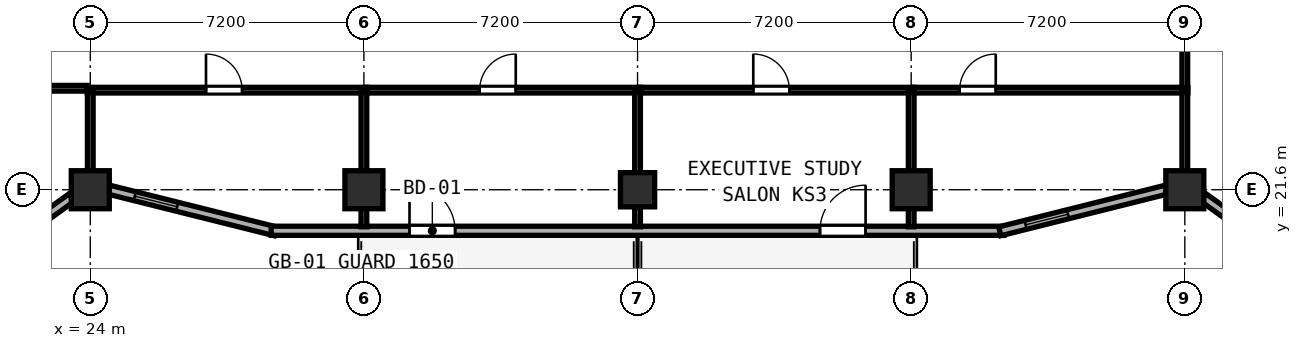
"""IFC4 building model, lengths in metres.
Left out: names, types, materials, properties, quantities, classifications, styles, units other than length and angle.
Written with IfcOpenShell. Run it as: python <this file> out.ifc"""

import sys

from ifc_helpers import new_model, si_unit, direction, frame, frame_2d, origin, origin_2d, place, context, subcontext, project, spatial, rectangle, hollow_rectangle, extrude, element, fill, save


model = new_model("IFC4")
c1 = context("Model", 3, precision=1e-05, world=origin(), true_north=direction((0.0, 1.0)))
c2 = subcontext(c1, "Body", "Model", "MODEL_VIEW")
j1 = project(units=[si_unit("LENGTHUNIT", "METRE"), si_unit("PLANEANGLEUNIT", "RADIAN")], contexts=[c1])
p1 = place(None, origin())
s1 = spatial("IfcSite", under=j1, at=p1, CompositionType="ELEMENT")
p2 = place(p1, origin())
s2 = spatial("IfcBuilding", under=s1, at=p2, CompositionType="ELEMENT")
p3 = place(p2, frame((0.0, 0.0, 98.4)))
s3 = spatial("IfcBuildingStorey", under=s2, at=p3, CompositionType="ELEMENT", Elevation=98.4)
for number, where, z_axis, x_axis in (
    (1, (24.0, 21.6, 0.0), (0.0, 0.0, 1.0), (1.0, 0.0, 0.0)),
    (2, (52.8, 21.6, 0.0), (0.0, 0.0, 1.0), (1.0, 0.0, 0.0)),
    (3, (31.2, 21.6, 0.0), (0.0, 0.0, 1.0), (1.0, 0.0, 0.0)),
    (4, (45.6, 21.6, 0.0), (0.0, 0.0, 1.0), (1.0, 0.0, 0.0)),
):
    element("IfcColumn", number, at=place(p3, frame(where, z_axis=z_axis, x_axis=x_axis)), inside=s3, PredefinedType="COLUMN", context=c2, shape_type="SweptSolid", body=[
        extrude(hollow_rectangle(XDim=1.0, YDim=1.0, WallThickness=0.038, at=origin_2d()), origin(), (0.0, 0.0, 1.0), 3.8),
    ])
p4 = place(p3, frame((38.4, 21.6, 0.0), z_axis=(0.0, 0.0, 1.0), x_axis=(1.0, 0.0, 0.0)))
e5 = element("IfcColumn", 5, at=p4, inside=s3, PredefinedType="COLUMN", context=c2, shape_type="SweptSolid", body=[
    extrude(hollow_rectangle(XDim=0.9, YDim=0.9, WallThickness=0.034, at=origin_2d()), origin(), (0.0, 0.0, 1.0), 3.8),
])
p5 = place(p3, frame((14.075, 14.602, 0.0), z_axis=(0.0, 0.0, 1.0), x_axis=(0.811543504691, 0.584291998913, 0.0)))
e6 = element("IfcWall", 6, at=p5, inside=s3, PredefinedType="SOLIDWALL", context=c2, shape_type="SweptSolid", body=[
    extrude(rectangle(XDim=11.623, YDim=0.24, at=frame_2d((5.812, 0.0))), origin(), (0.0, 0.0, 1.0), 3.145),
])
p6 = place(p5, frame((0.7, 0.0, 0.85)))
e7 = element("IfcOpeningElement", 7, at=p6, cuts=e6, PredefinedType="OPENING", context=c2, shape_type="SweptSolid", body=[
    extrude(rectangle(XDim=1.15, YDim=1.8, at=frame_2d((0.575, 0.9))), frame((0.0, 0.13, 0.0), z_axis=(0.0, -1.0, 0.0), x_axis=(1.0, 0.0, 0.0)), (0.0, 0.0, 1.0), 0.26),
])
p7 = place(p5, frame((5.954, 0.0, 0.85)))
e8 = element("IfcOpeningElement", 8, at=p7, cuts=e6, PredefinedType="OPENING", context=c2, shape_type="SweptSolid", body=[
    extrude(rectangle(XDim=1.15, YDim=1.8, at=frame_2d((0.575, 0.9))), frame((0.0, 0.13, 0.0), z_axis=(0.0, -1.0, 0.0), x_axis=(1.0, 0.0, 0.0)), (0.0, 0.0, 1.0), 0.26),
])
p8 = place(p3, frame((24.492, 21.601, 0.0), z_axis=(0.0, 0.0, 1.0), x_axis=(0.970145683738, -0.242522890311, 0.0)))
e9 = element("IfcWall", 9, at=p8, inside=s3, PredefinedType="SOLIDWALL", context=c2, shape_type="SweptSolid", body=[
    extrude(rectangle(XDim=4.511, YDim=0.24, at=frame_2d((2.255, 0.0))), origin(), (0.0, 0.0, 1.0), 3.145),
])
p9 = place(p8, frame((0.7, 0.0, 0.85)))
e10 = element("IfcOpeningElement", 10, at=p9, cuts=e9, PredefinedType="OPENING", context=c2, shape_type="SweptSolid", body=[
    extrude(rectangle(XDim=1.15, YDim=1.8, at=frame_2d((0.575, 0.9))), frame((0.0, 0.13, 0.0), z_axis=(0.0, -1.0, 0.0), x_axis=(1.0, 0.0, 0.0)), (0.0, 0.0, 1.0), 0.26),
])
p10 = place(p3, frame((28.76, 20.52, 0.0), z_axis=(0.0, 0.0, 1.0), x_axis=(1.0, 0.0, 0.0)))
e11 = element("IfcWall", 11, at=p10, inside=s3, PredefinedType="SOLIDWALL", context=c2, shape_type="SweptSolid", body=[
    extrude(rectangle(XDim=19.281, YDim=0.24, at=frame_2d((9.64, 0.0))), origin(), (0.0, 0.0, 1.0), 3.6),
])
p11 = place(p10, frame((4.84, 0.0, 0.0), z_axis=(0.0, 0.0, 1.0), x_axis=(-1.0, 0.0, 0.0)))
e12 = element("IfcOpeningElement", 12, at=p11, cuts=e11, PredefinedType="OPENING", context=c2, shape_type="SweptSolid", body=[
    extrude(rectangle(XDim=1.2, YDim=2.15, at=frame_2d((0.6, 1.075))), frame((0.0, 0.13, 0.0), z_axis=(0.0, -1.0, 0.0), x_axis=(1.0, 0.0, 0.0)), (0.0, 0.0, 1.0), 0.26),
])
p12 = place(p10, frame((15.64, 0.0, 0.0), z_axis=(0.0, 0.0, 1.0), x_axis=(-1.0, 0.0, 0.0)))
e13 = element("IfcOpeningElement", 13, at=p12, cuts=e11, PredefinedType="OPENING", context=c2, shape_type="SweptSolid", body=[
    extrude(rectangle(XDim=1.2, YDim=2.15, at=frame_2d((0.6, 1.075))), frame((0.0, 0.13, 0.0), z_axis=(0.0, -1.0, 0.0), x_axis=(1.0, 0.0, 0.0)), (0.0, 0.0, 1.0), 0.26),
])
p13 = place(p3, frame((47.932, 20.507, 0.0), z_axis=(0.0, 0.0, 1.0), x_axis=(0.970145683738, 0.242522890311, 0.0)))
e14 = element("IfcWall", 14, at=p13, inside=s3, PredefinedType="SOLIDWALL", context=c2, shape_type="SweptSolid", body=[
    extrude(rectangle(XDim=4.511, YDim=0.24, at=frame_2d((2.255, 0.0))), origin(), (0.0, 0.0, 1.0), 3.145),
])
p14 = place(p13, frame((0.7, 0.0, 0.85)))
e15 = element("IfcOpeningElement", 15, at=p14, cuts=e14, PredefinedType="OPENING", context=c2, shape_type="SweptSolid", body=[
    extrude(rectangle(XDim=1.15, YDim=1.8, at=frame_2d((0.575, 0.9))), frame((0.0, 0.13, 0.0), z_axis=(0.0, -1.0, 0.0), x_axis=(1.0, 0.0, 0.0)), (0.0, 0.0, 1.0), 0.26),
])
p15 = place(p3, frame((53.292, 21.394, 0.0), z_axis=(0.0, 0.0, 1.0), x_axis=(0.811543504691, -0.584291998913, 0.0)))
e16 = element("IfcWall", 16, at=p15, inside=s3, PredefinedType="SOLIDWALL", context=c2, shape_type="SweptSolid", body=[
    extrude(rectangle(XDim=11.623, YDim=0.24, at=frame_2d((5.812, 0.0))), origin(), (0.0, 0.0, 1.0), 3.145),
])
p16 = place(p15, frame((0.7, 0.0, 0.85)))
e17 = element("IfcOpeningElement", 17, at=p16, cuts=e16, PredefinedType="OPENING", context=c2, shape_type="SweptSolid", body=[
    extrude(rectangle(XDim=1.15, YDim=1.8, at=frame_2d((0.575, 0.9))), frame((0.0, 0.13, 0.0), z_axis=(0.0, -1.0, 0.0), x_axis=(1.0, 0.0, 0.0)), (0.0, 0.0, 1.0), 0.26),
])
p17 = place(p15, frame((6.688, 0.0, 0.85)))
e18 = element("IfcOpeningElement", 18, at=p17, cuts=e16, PredefinedType="OPENING", context=c2, shape_type="SweptSolid", body=[
    extrude(rectangle(XDim=1.15, YDim=1.8, at=frame_2d((0.575, 0.9))), frame((0.0, 0.13, 0.0), z_axis=(0.0, -1.0, 0.0), x_axis=(1.0, 0.0, 0.0)), (0.0, 0.0, 1.0), 0.26),
])
p18 = place(p3, frame((23.92, 24.22, 0.0), z_axis=(0.0, 0.0, 1.0), x_axis=(1.0, 0.0, 0.0)))
e19 = element("IfcWall", 19, at=p18, inside=s3, PredefinedType="PARTITIONING", context=c2, shape_type="SweptSolid", body=[
    extrude(rectangle(XDim=7.36, YDim=0.15, at=frame_2d((3.68, 0.0))), origin(), (0.0, 0.0, 1.0), 3.6),
])
p19 = place(p18, frame((4.075, 0.0, 0.0), z_axis=(0.0, 0.0, 1.0), x_axis=(-1.0, 0.0, 0.0)))
e20 = element("IfcOpeningElement", 20, at=p19, cuts=e19, PredefinedType="OPENING", context=c2, shape_type="SweptSolid", body=[
    extrude(rectangle(XDim=0.95, YDim=2.12, at=frame_2d((0.475, 1.06))), frame((0.0, 0.085, 0.0), z_axis=(0.0, -1.0, 0.0), x_axis=(1.0, 0.0, 0.0)), (0.0, 0.0, 1.0), 0.17),
])
p20 = place(p3, frame((24.0, 21.819, 0.0), z_axis=(0.0, 0.0, 1.0), x_axis=(0.0, 1.0, 0.0)))
e21 = element("IfcWall", 21, at=p20, inside=s3, PredefinedType="PARTITIONING", context=c2, shape_type="SweptSolid", body=[
    extrude(rectangle(XDim=2.341, YDim=0.15, at=frame_2d((1.171, 0.0))), origin(), (0.0, 0.0, 1.0), 3.145),
])
p21 = place(p3, frame((31.2, 20.625, 0.0), z_axis=(0.0, 0.0, 1.0), x_axis=(0.0, 1.0, 0.0)))
e22 = element("IfcWall", 22, at=p21, inside=s3, PredefinedType="PARTITIONING", context=c2, shape_type="SweptSolid", body=[
    extrude(rectangle(XDim=3.535, YDim=0.15, at=frame_2d((1.768, 0.0))), origin(), (0.0, 0.0, 1.0), 3.085),
])
p22 = place(p3, frame((31.282, 24.22, 0.0), z_axis=(0.0, 0.0, 1.0), x_axis=(1.0, 0.0, 0.0)))
e23 = element("IfcWall", 23, at=p22, inside=s3, PredefinedType="PARTITIONING", context=c2, shape_type="SweptSolid", body=[
    extrude(rectangle(XDim=7.198, YDim=0.15, at=frame_2d((3.599, 0.0))), origin(), (0.0, 0.0, 1.0), 3.6),
])
p23 = place(p22, frame((3.913, 0.0, 0.0), z_axis=(0.0, 0.0, 1.0), x_axis=(-1.0, 0.0, 0.0)))
e24 = element("IfcOpeningElement", 24, at=p23, cuts=e23, PredefinedType="OPENING", context=c2, shape_type="SweptSolid", body=[
    extrude(rectangle(XDim=0.95, YDim=2.12, at=frame_2d((0.475, 1.06))), frame((0.0, 0.085, 0.0), z_axis=(0.0, -1.0, 0.0), x_axis=(1.0, 0.0, 0.0)), (0.0, 0.0, 1.0), 0.17),
])
p24 = place(p3, frame((38.4, 20.625, 0.0), z_axis=(0.0, 0.0, 1.0), x_axis=(0.0, 1.0, 0.0)))
e25 = element("IfcWall", 25, at=p24, inside=s3, PredefinedType="PARTITIONING", context=c2, shape_type="SweptSolid", body=[
    extrude(rectangle(XDim=3.535, YDim=0.15, at=frame_2d((1.768, 0.0))), origin(), (0.0, 0.0, 1.0), 3.085),
])
p25 = place(p3, frame((38.482, 24.22, 0.0), z_axis=(0.0, 0.0, 1.0), x_axis=(1.0, 0.0, 0.0)))
e26 = element("IfcWall", 26, at=p25, inside=s3, PredefinedType="PARTITIONING", context=c2, shape_type="SweptSolid", body=[
    extrude(rectangle(XDim=7.198, YDim=0.15, at=frame_2d((3.599, 0.0))), origin(), (0.0, 0.0, 1.0), 3.6),
])
p26 = place(p25, frame((3.913, 0.0, 0.0), z_axis=(0.0, 0.0, 1.0), x_axis=(-1.0, 0.0, 0.0)))
e27 = element("IfcOpeningElement", 27, at=p26, cuts=e26, PredefinedType="OPENING", context=c2, shape_type="SweptSolid", body=[
    extrude(rectangle(XDim=0.95, YDim=2.12, at=frame_2d((0.475, 1.06))), frame((0.0, 0.085, 0.0), z_axis=(0.0, -1.0, 0.0), x_axis=(1.0, 0.0, 0.0)), (0.0, 0.0, 1.0), 0.17),
])
p27 = place(p3, frame((45.6, 20.625, 0.0), z_axis=(0.0, 0.0, 1.0), x_axis=(0.0, 1.0, 0.0)))
e28 = element("IfcWall", 28, at=p27, inside=s3, PredefinedType="PARTITIONING", context=c2, shape_type="SweptSolid", body=[
    extrude(rectangle(XDim=3.535, YDim=0.15, at=frame_2d((1.768, 0.0))), origin(), (0.0, 0.0, 1.0), 3.085),
])
p28 = place(p3, frame((45.682, 24.22, 0.0), z_axis=(0.0, 0.0, 1.0), x_axis=(1.0, 0.0, 0.0)))
e29 = element("IfcWall", 29, at=p28, inside=s3, PredefinedType="PARTITIONING", context=c2, shape_type="SweptSolid", body=[
    extrude(rectangle(XDim=7.198, YDim=0.15, at=frame_2d((3.599, 0.0))), origin(), (0.0, 0.0, 1.0), 3.6),
])
p29 = place(p28, frame((2.143, 0.0, 0.0), z_axis=(0.0, 0.0, 1.0), x_axis=(-1.0, 0.0, 0.0)))
e30 = element("IfcOpeningElement", 30, at=p29, cuts=e29, PredefinedType="OPENING", context=c2, shape_type="SweptSolid", body=[
    extrude(rectangle(XDim=0.95, YDim=2.12, at=frame_2d((0.475, 1.06))), frame((0.0, 0.085, 0.0), z_axis=(0.0, -1.0, 0.0), x_axis=(1.0, 0.0, 0.0)), (0.0, 0.0, 1.0), 0.17),
])
p30 = place(p3, frame((52.8, 21.819, 0.0), z_axis=(0.0, 0.0, 1.0), x_axis=(0.0, 1.0, 0.0)))
e31 = element("IfcWall", 31, at=p30, inside=s3, PredefinedType="PARTITIONING", context=c2, shape_type="SweptSolid", body=[
    extrude(rectangle(XDim=2.341, YDim=0.15, at=frame_2d((1.171, 0.0))), origin(), (0.0, 0.0, 1.0), 3.145),
])
p31 = place(p3, frame((20.072, 24.27, 0.0), z_axis=(0.0, 0.0, 1.0), x_axis=(1.0, 0.0, 0.0)))
e32 = element("IfcWall", 32, at=p31, inside=s3, PredefinedType="PARTITIONING", context=c2, shape_type="SweptSolid", body=[
    extrude(rectangle(XDim=3.846, YDim=0.15, at=frame_2d((1.923, 0.0))), origin(), (0.0, 0.0, 1.0), 3.6),
])
p32 = place(p31, frame((2.308, 0.0, 0.0), z_axis=(0.0, 0.0, 1.0), x_axis=(-1.0, 0.0, 0.0)))
e33 = element("IfcOpeningElement", 33, at=p32, cuts=e32, PredefinedType="OPENING", context=c2, shape_type="SweptSolid", body=[
    extrude(rectangle(XDim=0.95, YDim=2.12, at=frame_2d((0.475, 1.06))), frame((0.0, 0.085, 0.0), z_axis=(0.0, -1.0, 0.0), x_axis=(1.0, 0.0, 0.0)), (0.0, 0.0, 1.0), 0.17),
])
p33 = place(p3, frame((52.8, 24.28, 0.0), z_axis=(0.0, 0.0, 1.0), x_axis=(0.0, 1.0, 0.0)))
e34 = element("IfcWall", 34, at=p33, inside=s3, PredefinedType="PARTITIONING", context=c2, shape_type="SweptSolid", body=[
    extrude(rectangle(XDim=2.01, YDim=0.15, at=frame_2d((1.005, 0.0))), origin(), (0.0, 0.0, 1.0), 3.145),
])
p34 = place(p9, origin())
e35 = element("IfcWindow", 35, at=p34, inside=s3, PartitioningType="SINGLE_PANEL", PredefinedType="WINDOW", context=c2, shape_type="SweptSolid", body=[
    extrude(rectangle(XDim=1.15, YDim=1.8, at=frame_2d((0.575, 0.9))), frame((0.0, 0.03, 0.0), z_axis=(0.0, -1.0, 0.0), x_axis=(1.0, 0.0, 0.0)), (0.0, 0.0, 1.0), 0.06),
])
fill(e10, e35)
p35 = place(p14, origin())
e36 = element("IfcWindow", 36, at=p35, inside=s3, PartitioningType="SINGLE_PANEL", PredefinedType="WINDOW", context=c2, shape_type="SweptSolid", body=[
    extrude(rectangle(XDim=1.15, YDim=1.8, at=frame_2d((0.575, 0.9))), frame((0.0, 0.03, 0.0), z_axis=(0.0, -1.0, 0.0), x_axis=(1.0, 0.0, 0.0)), (0.0, 0.0, 1.0), 0.06),
])
fill(e15, e36)
p36 = place(p11, origin())
e37 = element("IfcDoor", 37, at=p36, inside=s3, OperationType="SINGLE_SWING_RIGHT", PredefinedType="DOOR", context=c2, shape_type="SweptSolid", body=[
    extrude(rectangle(XDim=1.2, YDim=2.15, at=frame_2d((0.6, 1.075))), frame((0.0, 0.025, 0.0), z_axis=(0.0, -1.0, 0.0), x_axis=(1.0, 0.0, 0.0)), (0.0, 0.0, 1.0), 0.05),
])
fill(e12, e37)
p37 = place(p12, origin())
e38 = element("IfcDoor", 38, at=p37, inside=s3, OperationType="SINGLE_SWING_LEFT", PredefinedType="DOOR", context=c2, shape_type="SweptSolid", body=[
    extrude(rectangle(XDim=1.2, YDim=2.15, at=frame_2d((0.6, 1.075))), frame((0.0, 0.025, 0.0), z_axis=(0.0, -1.0, 0.0), x_axis=(1.0, 0.0, 0.0)), (0.0, 0.0, 1.0), 0.05),
])
fill(e13, e38)
p38 = place(p19, origin())
e39 = element("IfcDoor", 39, at=p38, inside=s3, OperationType="SINGLE_SWING_RIGHT", PredefinedType="DOOR", context=c2, shape_type="SweptSolid", body=[
    extrude(rectangle(XDim=0.95, YDim=2.12, at=frame_2d((0.475, 1.06))), frame((0.0, 0.025, 0.0), z_axis=(0.0, -1.0, 0.0), x_axis=(1.0, 0.0, 0.0)), (0.0, 0.0, 1.0), 0.05),
])
fill(e20, e39)
p39 = place(p23, origin())
e40 = element("IfcDoor", 40, at=p39, inside=s3, OperationType="SINGLE_SWING_LEFT", PredefinedType="DOOR", context=c2, shape_type="SweptSolid", body=[
    extrude(rectangle(XDim=0.95, YDim=2.12, at=frame_2d((0.475, 1.06))), frame((0.0, 0.025, 0.0), z_axis=(0.0, -1.0, 0.0), x_axis=(1.0, 0.0, 0.0)), (0.0, 0.0, 1.0), 0.05),
])
fill(e24, e40)
p40 = place(p26, origin())
e41 = element("IfcDoor", 41, at=p40, inside=s3, OperationType="SINGLE_SWING_RIGHT", PredefinedType="DOOR", context=c2, shape_type="SweptSolid", body=[
    extrude(rectangle(XDim=0.95, YDim=2.12, at=frame_2d((0.475, 1.06))), frame((0.0, 0.025, 0.0), z_axis=(0.0, -1.0, 0.0), x_axis=(1.0, 0.0, 0.0)), (0.0, 0.0, 1.0), 0.05),
])
fill(e27, e41)
p41 = place(p29, origin())
e42 = element("IfcDoor", 42, at=p41, inside=s3, OperationType="SINGLE_SWING_LEFT", PredefinedType="DOOR", context=c2, shape_type="SweptSolid", body=[
    extrude(rectangle(XDim=0.95, YDim=2.12, at=frame_2d((0.475, 1.06))), frame((0.0, 0.025, 0.0), z_axis=(0.0, -1.0, 0.0), x_axis=(1.0, 0.0, 0.0)), (0.0, 0.0, 1.0), 0.05),
])
fill(e30, e42)
save(model, sys.argv[1])
